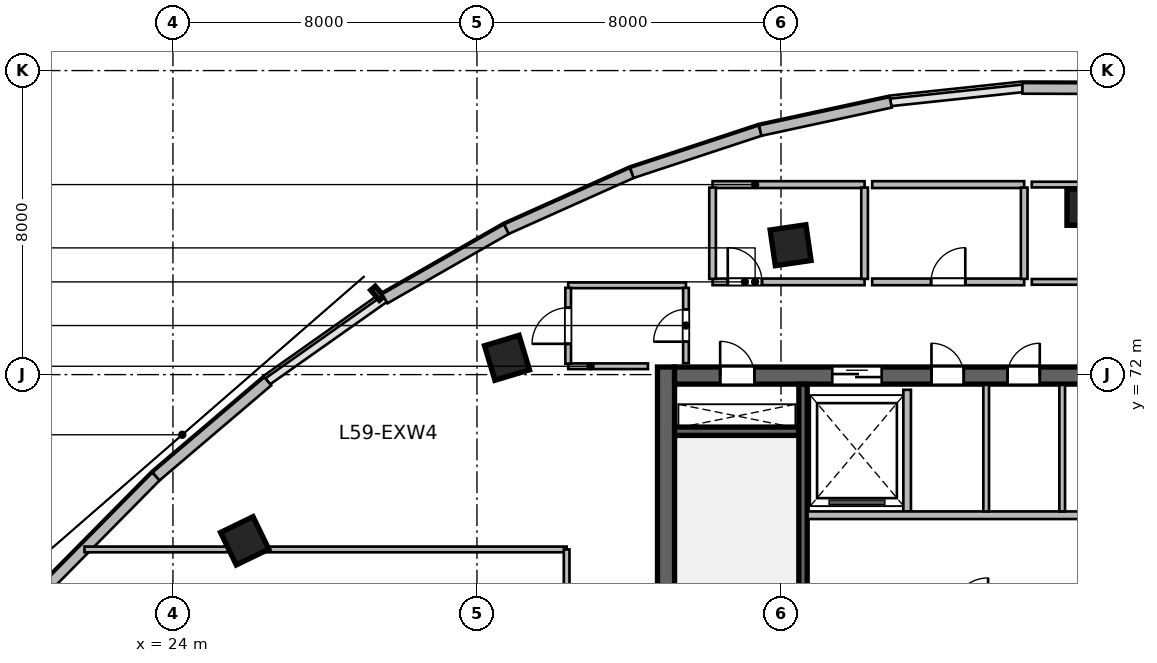
"""IFC4 building model, lengths in metres.
Left out: names, types, materials, properties, quantities, classifications, styles, units other than length and angle.
Written with IfcOpenShell. Run it as: python <this file> out.ifc"""

import sys

from ifc_helpers import new_model, si_unit, direction, frame, frame_2d, origin, origin_2d, place, context, subcontext, project, spatial, rectangle, extrude, source, transform, mapped, element, fill, save


model = new_model("IFC4")
c1 = context("Model", 3, precision=1e-05, world=origin(), true_north=direction((0.0, 1.0)))
c2 = subcontext(c1, "Body", "Model", "MODEL_VIEW")
j1 = project(units=[si_unit("LENGTHUNIT", "METRE"), si_unit("PLANEANGLEUNIT", "RADIAN")], contexts=[c1])
p1 = place(None, origin())
s1 = spatial("IfcSite", under=j1, at=p1, CompositionType="ELEMENT")
p2 = place(p1, origin())
s2 = spatial("IfcBuilding", under=s1, at=p2, CompositionType="ELEMENT")
p3 = place(p2, frame((0.0, 0.0, 243.0)))
s3 = spatial("IfcBuildingStorey", under=s2, at=p3, CompositionType="ELEMENT", Elevation=243.0)
m1 = source(origin(), c2, "Body", "SweptSolid", [
    extrude(rectangle(XDim=12.0, YDim=0.45, at=frame_2d((6.0, 0.0))), origin(), (0.0, 0.0, 1.0), 3.9),
])
p4 = place(p3, frame((36.975, 60.2, 0.0), z_axis=(0.0, 0.0, 1.0), x_axis=(0.0, 1.0, 0.0)))
e1 = element("IfcWall", 1, at=p4, inside=s3, PredefinedType="SHEAR", context=c2, shape_type="MappedRepresentation", body=[
    mapped(m1, transform((0.0, 0.0, 0.0), scale=1.0)),
])
m2 = source(origin(), c2, "Body", "SweptSolid", [
    extrude(rectangle(XDim=21.6, YDim=0.45, at=frame_2d((10.8, 0.0))), origin(), (0.0, 0.0, 1.0), 3.9),
])
p5 = place(p3, frame((37.2, 71.975, 0.0), z_axis=(0.0, 0.0, 1.0), x_axis=(1.0, 0.0, 0.0)))
e2 = element("IfcWall", 2, at=p5, inside=s3, PredefinedType="SHEAR", context=c2, shape_type="MappedRepresentation", body=[
    mapped(m2, transform((0.0, 0.0, 0.0), scale=1.0)),
])
p6 = place(p5, frame((1.2, 0.0, 0.0)))
e3 = element("IfcOpeningElement", 3, at=p6, cuts=e2, PredefinedType="OPENING", context=c2, shape_type="SweptSolid", body=[
    extrude(rectangle(XDim=0.9, YDim=2.1, at=frame_2d((0.45, 1.05))), frame((0.0, 0.235, 0.0), z_axis=(0.0, -1.0, 0.0), x_axis=(1.0, 0.0, 0.0)), (0.0, 0.0, 1.0), 0.47),
])
p7 = place(p5, frame((14.7, 0.0, 0.0)))
e4 = element("IfcOpeningElement", 4, at=p7, cuts=e2, PredefinedType="OPENING", context=c2, shape_type="SweptSolid", body=[
    extrude(rectangle(XDim=1.2, YDim=2.15, at=frame_2d((0.6, 1.075))), frame((0.0, 0.235, 0.0), z_axis=(0.0, -1.0, 0.0), x_axis=(1.0, 0.0, 0.0)), (0.0, 0.0, 1.0), 0.47),
])
p8 = place(p5, frame((4.15, 0.0, 0.0)))
e5 = element("IfcOpeningElement", 5, at=p8, cuts=e2, PredefinedType="OPENING", context=c2, shape_type="SweptSolid", body=[
    extrude(rectangle(XDim=1.3, YDim=2.15, at=frame_2d((0.65, 1.075))), frame((0.0, 0.235, 0.0), z_axis=(0.0, -1.0, 0.0), x_axis=(1.0, 0.0, 0.0)), (0.0, 0.0, 1.0), 0.47),
])
p9 = place(p5, frame((6.76, 0.0, 0.0)))
e6 = element("IfcOpeningElement", 6, at=p9, cuts=e2, PredefinedType="OPENING", context=c2, shape_type="SweptSolid", body=[
    extrude(rectangle(XDim=0.85, YDim=2.1, at=frame_2d((0.425, 1.05))), frame((0.0, 0.235, 0.0), z_axis=(0.0, -1.0, 0.0), x_axis=(1.0, 0.0, 0.0)), (0.0, 0.0, 1.0), 0.47),
])
p10 = place(p5, frame((8.76, 0.0, 0.0)))
e7 = element("IfcOpeningElement", 7, at=p10, cuts=e2, PredefinedType="OPENING", context=c2, shape_type="SweptSolid", body=[
    extrude(rectangle(XDim=0.85, YDim=2.1, at=frame_2d((0.425, 1.05))), frame((0.0, 0.235, 0.0), z_axis=(0.0, -1.0, 0.0), x_axis=(1.0, 0.0, 0.0)), (0.0, 0.0, 1.0), 0.47),
])
p11 = place(p5, frame((10.725, 0.0, 0.0)))
e8 = element("IfcOpeningElement", 8, at=p11, cuts=e2, PredefinedType="OPENING", context=c2, shape_type="SweptSolid", body=[
    extrude(rectangle(XDim=0.85, YDim=2.1, at=frame_2d((0.425, 1.05))), frame((0.0, 0.235, 0.0), z_axis=(0.0, -1.0, 0.0), x_axis=(1.0, 0.0, 0.0)), (0.0, 0.0, 1.0), 0.47),
])
m3 = source(origin(), c2, "Body", "SweptSolid", [
    extrude(rectangle(XDim=3.27, YDim=0.22, at=frame_2d((1.635, 0.0))), origin(), (0.0, 0.0, 1.0), 3.9),
])
p12 = place(p3, frame((37.2, 70.51, 0.0), z_axis=(0.0, 0.0, 1.0), x_axis=(1.0, 0.0, 0.0)))
e9 = element("IfcWall", 9, at=p12, inside=s3, PredefinedType="SHEAR", context=c2, shape_type="MappedRepresentation", body=[
    mapped(m3, transform((0.0, 0.0, 0.0), scale=1.0)),
])
m4 = source(origin(), c2, "Body", "SweptSolid", [
    extrude(rectangle(XDim=11.1, YDim=0.22, at=frame_2d((5.55, 0.0))), origin(), (0.0, 0.0, 1.0), 3.9),
])
p13 = place(p3, frame((40.58, 60.65, 0.0), z_axis=(0.0, 0.0, 1.0), x_axis=(0.0, 1.0, 0.0)))
e10 = element("IfcWall", 10, at=p13, inside=s3, PredefinedType="SHEAR", context=c2, shape_type="MappedRepresentation", body=[
    mapped(m4, transform((0.0, 0.0, 0.0), scale=1.0)),
])
m5 = source(origin(), c2, "Body", "SweptSolid", [
    extrude(rectangle(XDim=0.95, YDim=0.95, at=origin_2d()), origin(), (0.0, 0.0, 1.0), 3.9),
])
for number, where, z_axis, x_axis in (
    (11, (25.888, 67.627, 0.0), (0.0, 0.0, 1.0), (-0.436, 0.9, 0.0)),
    (12, (32.791, 72.442, 0.0), (0.0, 0.0, 1.0), (-0.289, 0.957, 0.0)),
    (13, (40.253, 75.404, 0.0), (0.0, 0.0, 1.0), (-0.143, 0.99, 0.0)),
    (14, (48.0, 76.404, 0.0), (0.0, 0.0, 1.0), (0.0, 1.0, 0.0)),
):
    element("IfcColumn", number, at=place(p3, frame(where, z_axis=z_axis, x_axis=x_axis)), inside=s3, PredefinedType="COLUMN", context=c2, shape_type="MappedRepresentation", body=[
        mapped(m5, transform((0.0, 0.0, 0.0), scale=1.0)),
    ])
m6 = source(origin(), c2, "Body", "SweptSolid", [
    extrude(rectangle(XDim=4.052, YDim=0.28, at=frame_2d((2.026, 0.0))), origin(), (0.0, 0.0, 1.0), 3.65),
])
p14 = place(p3, frame((18.176, 63.4, 0.0), z_axis=(0.0, 0.0, 1.0), x_axis=(0.641765301437, 0.76690110045, 0.0)))
e15 = element("IfcWall", 15, at=p14, inside=s3, PredefinedType="SOLIDWALL", context=c2, shape_type="MappedRepresentation", body=[
    mapped(m6, transform((0.0, 0.0, 0.0), scale=1.0)),
])
m7 = source(origin(), c2, "Body", "SweptSolid", [
    extrude(rectangle(XDim=3.955, YDim=0.28, at=frame_2d((1.978, 0.0))), origin(), (0.0, 0.0, 1.0), 3.65),
])
p15 = place(p3, frame((20.776, 66.507, 0.0), z_axis=(0.0, 0.0, 1.0), x_axis=(0.702710517474, 0.711475880569, 0.0)))
e16 = element("IfcWall", 16, at=p15, inside=s3, PredefinedType="SOLIDWALL", context=c2, shape_type="MappedRepresentation", body=[
    mapped(m7, transform((0.0, 0.0, 0.0), scale=1.0)),
])
m8 = source(origin(), c2, "Body", "SweptSolid", [
    extrude(rectangle(XDim=3.86, YDim=0.28, at=frame_2d((1.93, 0.0))), origin(), (0.0, 0.0, 1.0), 3.65),
])
p16 = place(p3, frame((23.556, 69.321, 0.0), z_axis=(0.0, 0.0, 1.0), x_axis=(0.761497547739, 0.648167790613, 0.0)))
e17 = element("IfcWall", 17, at=p16, inside=s3, PredefinedType="SOLIDWALL", context=c2, shape_type="MappedRepresentation", body=[
    mapped(m8, transform((0.0, 0.0, 0.0), scale=1.0)),
])
m9 = source(origin(), c2, "Body", "SweptSolid", [
    extrude(rectangle(XDim=3.688, YDim=0.28, at=frame_2d((1.844, 0.0))), origin(), (0.0, 0.0, 1.0), 3.65),
])
p17 = place(p3, frame((29.576, 73.998, 0.0), z_axis=(0.0, 0.0, 1.0), x_axis=(0.867929289274, 0.496687778005, 0.0)))
e18 = element("IfcWall", 18, at=p17, inside=s3, PredefinedType="SOLIDWALL", context=c2, shape_type="MappedRepresentation", body=[
    mapped(m9, transform((0.0, 0.0, 0.0), scale=1.0)),
])
m10 = source(origin(), c2, "Body", "SweptSolid", [
    extrude(rectangle(XDim=3.616, YDim=0.28, at=frame_2d((1.808, 0.0))), origin(), (0.0, 0.0, 1.0), 3.65),
])
p18 = place(p3, frame((32.777, 75.829, 0.0), z_axis=(0.0, 0.0, 1.0), x_axis=(0.912719530576, 0.408586659726, 0.0)))
e19 = element("IfcWall", 19, at=p18, inside=s3, PredefinedType="SOLIDWALL", context=c2, shape_type="MappedRepresentation", body=[
    mapped(m10, transform((0.0, 0.0, 0.0), scale=1.0)),
])
m11 = source(origin(), c2, "Body", "SweptSolid", [
    extrude(rectangle(XDim=3.557, YDim=0.28, at=frame_2d((1.778, 0.0))), origin(), (0.0, 0.0, 1.0), 3.65),
])
p19 = place(p3, frame((36.077, 77.307, 0.0), z_axis=(0.0, 0.0, 1.0), x_axis=(0.949687460385, 0.31319918197, 0.0)))
e20 = element("IfcWall", 20, at=p19, inside=s3, PredefinedType="SOLIDWALL", context=c2, shape_type="MappedRepresentation", body=[
    mapped(m11, transform((0.0, 0.0, 0.0), scale=1.0)),
])
m12 = source(origin(), c2, "Body", "SweptSolid", [
    extrude(rectangle(XDim=3.513, YDim=0.28, at=frame_2d((1.756, 0.0))), origin(), (0.0, 0.0, 1.0), 3.65),
])
p20 = place(p3, frame((39.455, 78.421, 0.0), z_axis=(0.0, 0.0, 1.0), x_axis=(0.977366029072, 0.211555300611, 0.0)))
e21 = element("IfcWall", 21, at=p20, inside=s3, PredefinedType="SOLIDWALL", context=c2, shape_type="MappedRepresentation", body=[
    mapped(m12, transform((0.0, 0.0, 0.0), scale=1.0)),
])
m13 = source(origin(), c2, "Body", "SweptSolid", [
    extrude(rectangle(XDim=3.477, YDim=0.28, at=frame_2d((1.739, 0.0))), origin(), (0.0, 0.0, 1.0), 3.65),
])
p21 = place(p3, frame((46.355, 79.531, 0.0), z_axis=(0.0, 0.0, 1.0), x_axis=(0.999995652268, -0.002948804142, 0.0)))
e22 = element("IfcWall", 22, at=p21, inside=s3, PredefinedType="SOLIDWALL", context=c2, shape_type="MappedRepresentation", body=[
    mapped(m13, transform((0.0, 0.0, 0.0), scale=1.0)),
])
m14 = source(origin(), c2, "Body", "SweptSolid", [
    extrude(rectangle(XDim=3.2, YDim=0.2, at=frame_2d((1.6, 0.0))), origin(), (0.0, 0.0, 1.0), 3.65),
])
p22 = place(p3, frame((43.32, 68.4, 0.0), z_axis=(0.0, 0.0, 1.0), x_axis=(0.0, 1.0, 0.0)))
e23 = element("IfcWall", 23, at=p22, inside=s3, PredefinedType="SOLIDWALL", context=c2, shape_type="MappedRepresentation", body=[
    mapped(m14, transform((0.0, 0.0, 0.0), scale=1.0)),
])
m15 = source(origin(), c2, "Body", "SweptSolid", [
    extrude(rectangle(XDim=8.8, YDim=0.2, at=frame_2d((4.4, 0.0))), origin(), (0.0, 0.0, 1.0), 3.65),
])
p23 = place(p3, frame((40.7, 68.3, 0.0), z_axis=(0.0, 0.0, 1.0), x_axis=(1.0, 0.0, 0.0)))
e24 = element("IfcWall", 24, at=p23, inside=s3, PredefinedType="SOLIDWALL", context=c2, shape_type="MappedRepresentation", body=[
    mapped(m15, transform((0.0, 0.0, 0.0), scale=1.0)),
])
m16 = source(origin(), c2, "Body", "SweptSolid", [
    extrude(rectangle(XDim=3.33, YDim=0.15, at=frame_2d((1.665, 0.0))), origin(), (0.0, 0.0, 1.0), 3.65),
])
for number, where, z_axis, x_axis in (
    (25, (45.4, 68.4, 0.0), (0.0, 0.0, 1.0), (0.0, 1.0, 0.0)),
    (26, (47.4, 68.4, 0.0), (0.0, 0.0, 1.0), (0.0, 1.0, 0.0)),
):
    element("IfcWall", number, at=place(p3, frame(where, z_axis=z_axis, x_axis=x_axis)), inside=s3, PredefinedType="PARTITIONING", context=c2, shape_type="MappedRepresentation", body=[
        mapped(m16, transform((0.0, 0.0, 0.0), scale=1.0)),
    ])
m17 = source(origin(), c2, "Body", "SweptSolid", [
    extrude(rectangle(XDim=2.1, YDim=0.15, at=frame_2d((1.05, 0.0))), origin(), (0.0, 0.0, 1.0), 3.65),
])
p24 = place(p3, frame((34.4, 72.22, 0.0), z_axis=(0.0, 0.0, 1.0), x_axis=(1.0, 0.0, 0.0)))
e27 = element("IfcWall", 27, at=p24, inside=s3, PredefinedType="PARTITIONING", context=c2, shape_type="MappedRepresentation", body=[
    mapped(m17, transform((0.0, 0.0, 0.0), scale=1.0)),
])
m18 = source(origin(), c2, "Body", "SweptSolid", [
    extrude(rectangle(XDim=3.1, YDim=0.15, at=frame_2d((1.55, 0.0))), origin(), (0.0, 0.0, 1.0), 3.081),
])
p25 = place(p3, frame((34.4, 74.35, 0.0), z_axis=(0.0, 0.0, 1.0), x_axis=(1.0, 0.0, 0.0)))
e28 = element("IfcWall", 28, at=p25, inside=s3, PredefinedType="PARTITIONING", context=c2, shape_type="MappedRepresentation", body=[
    mapped(m18, transform((0.0, 0.0, 0.0), scale=1.0)),
])
m19 = source(origin(), c2, "Body", "SweptSolid", [
    extrude(rectangle(XDim=1.995, YDim=0.15, at=frame_2d((0.998, 0.0))), origin(), (0.0, 0.0, 1.0), 3.65),
])
p26 = place(p3, frame((34.4, 72.288, 0.0), z_axis=(0.0, 0.0, 1.0), x_axis=(0.0, 1.0, 0.0)))
e29 = element("IfcWall", 29, at=p26, inside=s3, PredefinedType="PARTITIONING", context=c2, shape_type="MappedRepresentation", body=[
    mapped(m19, transform((0.0, 0.0, 0.0), scale=1.0)),
])
p27 = place(p26, frame((0.522, 0.0, 0.0)))
e30 = element("IfcOpeningElement", 30, at=p27, cuts=e29, PredefinedType="OPENING", context=c2, shape_type="SweptSolid", body=[
    extrude(rectangle(XDim=0.95, YDim=2.1, at=frame_2d((0.475, 1.05))), frame((0.0, 0.085, 0.0), z_axis=(0.0, -1.0, 0.0), x_axis=(1.0, 0.0, 0.0)), (0.0, 0.0, 1.0), 0.17),
])
m20 = source(origin(), c2, "Body", "SweptSolid", [
    extrude(rectangle(XDim=1.982, YDim=0.15, at=frame_2d((0.991, 0.0))), origin(), (0.0, 0.0, 1.0), 3.65),
])
p28 = place(p3, frame((37.5, 72.3, 0.0), z_axis=(0.0, 0.0, 1.0), x_axis=(0.0, 1.0, 0.0)))
e31 = element("IfcWall", 31, at=p28, inside=s3, PredefinedType="PARTITIONING", context=c2, shape_type="MappedRepresentation", body=[
    mapped(m20, transform((0.0, 0.0, 0.0), scale=1.0)),
])
p29 = place(p28, frame((0.566, 0.0, 0.0)))
e32 = element("IfcOpeningElement", 32, at=p29, cuts=e31, PredefinedType="OPENING", context=c2, shape_type="SweptSolid", body=[
    extrude(rectangle(XDim=0.85, YDim=2.1, at=frame_2d((0.425, 1.05))), frame((0.0, 0.085, 0.0), z_axis=(0.0, -1.0, 0.0), x_axis=(1.0, 0.0, 0.0)), (0.0, 0.0, 1.0), 0.17),
])
m21 = source(origin(), c2, "Body", "SweptSolid", [
    extrude(rectangle(XDim=4.0, YDim=0.175, at=frame_2d((2.0, 0.0))), origin(), (0.0, 0.0, 1.0), 3.65),
])
p30 = place(p3, frame((38.2, 74.44, 0.0), z_axis=(0.0, 0.0, 1.0), x_axis=(1.0, 0.0, 0.0)))
e33 = element("IfcWall", 33, at=p30, inside=s3, PredefinedType="PARTITIONING", context=c2, shape_type="MappedRepresentation", body=[
    mapped(m21, transform((0.0, 0.0, 0.0), scale=1.0)),
])
p31 = place(p30, frame((0.4, 0.0, 0.0)))
e34 = element("IfcOpeningElement", 34, at=p31, cuts=e33, PredefinedType="OPENING", context=c2, shape_type="SweptSolid", body=[
    extrude(rectangle(XDim=0.9, YDim=2.08, at=frame_2d((0.45, 1.04))), frame((0.0, 0.098, 0.0), z_axis=(0.0, -1.0, 0.0), x_axis=(1.0, 0.0, 0.0)), (0.0, 0.0, 1.0), 0.195),
])
m22 = source(origin(), c2, "Body", "SweptSolid", [
    extrude(rectangle(XDim=4.0, YDim=0.18, at=frame_2d((2.0, 0.0))), origin(), (0.0, 0.0, 1.0), 3.65),
])
p32 = place(p3, frame((38.2, 77.0, 0.0), z_axis=(0.0, 0.0, 1.0), x_axis=(1.0, 0.0, 0.0)))
e35 = element("IfcWall", 35, at=p32, inside=s3, PredefinedType="PLUMBINGWALL", context=c2, shape_type="MappedRepresentation", body=[
    mapped(m22, transform((0.0, 0.0, 0.0), scale=1.0)),
])
m23 = source(origin(), c2, "Body", "SweptSolid", [
    extrude(rectangle(XDim=2.403, YDim=0.175, at=frame_2d((1.201, 0.0))), origin(), (0.0, 0.0, 1.0), 3.65),
])
for number, where, z_axis, x_axis in (
    (36, (38.2, 74.519, 0.0), (0.0, 0.0, 1.0), (0.0, 1.0, 0.0)),
    (37, (42.2, 74.519, 0.0), (0.0, 0.0, 1.0), (0.0, 1.0, 0.0)),
):
    element("IfcWall", number, at=place(p3, frame(where, z_axis=z_axis, x_axis=x_axis)), inside=s3, PredefinedType="PARTITIONING", context=c2, shape_type="MappedRepresentation", body=[
        mapped(m23, transform((0.0, 0.0, 0.0), scale=1.0)),
    ])
p33 = place(p3, frame((42.4, 74.44, 0.0), z_axis=(0.0, 0.0, 1.0), x_axis=(1.0, 0.0, 0.0)))
e38 = element("IfcWall", 38, at=p33, inside=s3, PredefinedType="PARTITIONING", context=c2, shape_type="MappedRepresentation", body=[
    mapped(m21, transform((0.0, 0.0, 0.0), scale=1.0)),
])
p34 = place(p33, frame((1.55, 0.0, 0.0)))
e39 = element("IfcOpeningElement", 39, at=p34, cuts=e38, PredefinedType="OPENING", context=c2, shape_type="SweptSolid", body=[
    extrude(rectangle(XDim=0.9, YDim=2.08, at=frame_2d((0.45, 1.04))), frame((0.0, 0.098, 0.0), z_axis=(0.0, -1.0, 0.0), x_axis=(1.0, 0.0, 0.0)), (0.0, 0.0, 1.0), 0.195),
])
p35 = place(p3, frame((42.4, 77.0, 0.0), z_axis=(0.0, 0.0, 1.0), x_axis=(1.0, 0.0, 0.0)))
e40 = element("IfcWall", 40, at=p35, inside=s3, PredefinedType="PLUMBINGWALL", context=c2, shape_type="MappedRepresentation", body=[
    mapped(m22, transform((0.0, 0.0, 0.0), scale=1.0)),
])
p36 = place(p3, frame((46.4, 74.519, 0.0), z_axis=(0.0, 0.0, 1.0), x_axis=(0.0, 1.0, 0.0)))
e41 = element("IfcWall", 41, at=p36, inside=s3, PredefinedType="PARTITIONING", context=c2, shape_type="MappedRepresentation", body=[
    mapped(m23, transform((0.0, 0.0, 0.0), scale=1.0)),
])
m24 = source(origin(), c2, "Body", "SweptSolid", [
    extrude(rectangle(XDim=4.4, YDim=0.15, at=frame_2d((2.2, 0.0))), origin(), (0.0, 0.0, 1.0), 3.65),
])
p37 = place(p3, frame((46.6, 74.44, 0.0), z_axis=(0.0, 0.0, 1.0), x_axis=(1.0, 0.0, 0.0)))
e42 = element("IfcWall", 42, at=p37, inside=s3, PredefinedType="PARTITIONING", context=c2, shape_type="MappedRepresentation", body=[
    mapped(m24, transform((0.0, 0.0, 0.0), scale=1.0)),
])
p38 = place(p37, frame((1.725, 0.0, 0.0)))
e43 = element("IfcOpeningElement", 43, at=p38, cuts=e42, PredefinedType="OPENING", context=c2, shape_type="SweptSolid", body=[
    extrude(rectangle(XDim=0.95, YDim=2.1, at=frame_2d((0.475, 1.05))), frame((0.0, 0.085, 0.0), z_axis=(0.0, -1.0, 0.0), x_axis=(1.0, 0.0, 0.0)), (0.0, 0.0, 1.0), 0.17),
])
p39 = place(p3, frame((46.6, 77.0, 0.0), z_axis=(0.0, 0.0, 1.0), x_axis=(1.0, 0.0, 0.0)))
e44 = element("IfcWall", 44, at=p39, inside=s3, PredefinedType="PARTITIONING", context=c2, shape_type="MappedRepresentation", body=[
    mapped(m24, transform((0.0, 0.0, 0.0), scale=1.0)),
])
m25 = source(origin(), c2, "Body", "SweptSolid", [
    extrude(rectangle(XDim=12.688, YDim=0.15, at=frame_2d((6.344, 0.0))), origin(), (0.0, 0.0, 1.0), 3.65),
])
p40 = place(p3, frame((21.672, 67.4, 0.0), z_axis=(0.0, 0.0, 1.0), x_axis=(1.0, 0.0, 0.0)))
e45 = element("IfcWall", 45, at=p40, inside=s3, PredefinedType="PARTITIONING", context=c2, shape_type="MappedRepresentation", body=[
    mapped(m25, transform((0.0, 0.0, 0.0), scale=1.0)),
])
m26 = source(origin(), c2, "Body", "SweptSolid", [
    extrude(rectangle(XDim=3.2, YDim=0.15, at=frame_2d((1.6, 0.0))), origin(), (0.0, 0.0, 1.0), 3.65),
])
p41 = place(p3, frame((34.36, 64.2, 0.0), z_axis=(0.0, 0.0, 1.0), x_axis=(0.0, 1.0, 0.0)))
e46 = element("IfcWall", 46, at=p41, inside=s3, PredefinedType="PARTITIONING", context=c2, shape_type="MappedRepresentation", body=[
    mapped(m26, transform((0.0, 0.0, 0.0), scale=1.0)),
])
p42 = place(p41, frame((1.125, 0.0, 0.0)))
e47 = element("IfcOpeningElement", 47, at=p42, cuts=e46, PredefinedType="OPENING", context=c2, shape_type="SweptSolid", body=[
    extrude(rectangle(XDim=0.95, YDim=2.1, at=frame_2d((0.475, 1.05))), frame((0.0, 0.085, 0.0), z_axis=(0.0, -1.0, 0.0), x_axis=(1.0, 0.0, 0.0)), (0.0, 0.0, 1.0), 0.17),
])
m27 = source(origin(), c2, "Body", "SweptSolid", [
    extrude(rectangle(XDim=0.9, YDim=2.1, at=frame_2d((0.45, 1.05))), frame((0.0, 0.025, 0.0), z_axis=(0.0, -1.0, 0.0), x_axis=(1.0, 0.0, 0.0)), (0.0, 0.0, 1.0), 0.05),
])
p43 = place(p6, origin())
e48 = element("IfcDoor", 48, at=p43, inside=s3, OperationType="SINGLE_SWING_LEFT", PredefinedType="DOOR", context=c2, shape_type="MappedRepresentation", body=[
    mapped(m27, transform((0.0, 0.0, 0.0), scale=1.0)),
])
fill(e3, e48)
m28 = source(origin(), c2, "Body", "SweptSolid", [
    extrude(rectangle(XDim=1.3, YDim=2.15, at=frame_2d((0.65, 1.075))), frame((0.0, 0.025, 0.0), z_axis=(0.0, -1.0, 0.0), x_axis=(1.0, 0.0, 0.0)), (0.0, 0.0, 1.0), 0.05),
])
p44 = place(p8, origin())
e49 = element("IfcDoor", 49, at=p44, inside=s3, OperationType="DOUBLE_DOOR_SLIDING", PredefinedType="DOOR", context=c2, shape_type="MappedRepresentation", body=[
    mapped(m28, transform((0.0, 0.0, 0.0), scale=1.0)),
])
fill(e5, e49)
m29 = source(origin(), c2, "Body", "SweptSolid", [
    extrude(rectangle(XDim=0.85, YDim=2.1, at=frame_2d((0.425, 1.05))), frame((0.0, 0.025, 0.0), z_axis=(0.0, -1.0, 0.0), x_axis=(1.0, 0.0, 0.0)), (0.0, 0.0, 1.0), 0.05),
])
p45 = place(p9, origin())
e50 = element("IfcDoor", 50, at=p45, inside=s3, OperationType="SINGLE_SWING_LEFT", PredefinedType="DOOR", context=c2, shape_type="MappedRepresentation", body=[
    mapped(m29, transform((0.0, 0.0, 0.0), scale=1.0)),
])
fill(e6, e50)
p46 = place(p10, origin())
e51 = element("IfcDoor", 51, at=p46, inside=s3, OperationType="SINGLE_SWING_RIGHT", PredefinedType="DOOR", context=c2, shape_type="MappedRepresentation", body=[
    mapped(m29, transform((0.0, 0.0, 0.0), scale=1.0)),
])
fill(e7, e51)
p47 = place(p29, origin())
e52 = element("IfcDoor", 52, at=p47, inside=s3, OperationType="SINGLE_SWING_LEFT", PredefinedType="DOOR", context=c2, shape_type="MappedRepresentation", body=[
    mapped(m29, transform((0.0, 0.0, 0.0), scale=1.0)),
])
fill(e32, e52)
m30 = source(origin(), c2, "Body", "SweptSolid", [
    extrude(rectangle(XDim=0.9, YDim=2.08, at=frame_2d((0.45, 1.04))), frame((0.0, 0.025, 0.0), z_axis=(0.0, -1.0, 0.0), x_axis=(1.0, 0.0, 0.0)), (0.0, 0.0, 1.0), 0.05),
])
p48 = place(p31, origin())
e53 = element("IfcDoor", 53, at=p48, inside=s3, OperationType="SINGLE_SWING_LEFT", PredefinedType="DOOR", context=c2, shape_type="MappedRepresentation", body=[
    mapped(m30, transform((0.0, 0.0, 0.0), scale=1.0)),
])
fill(e34, e53)
p49 = place(p34, origin())
e54 = element("IfcDoor", 54, at=p49, inside=s3, OperationType="SINGLE_SWING_RIGHT", PredefinedType="DOOR", context=c2, shape_type="MappedRepresentation", body=[
    mapped(m30, transform((0.0, 0.0, 0.0), scale=1.0)),
])
fill(e39, e54)
m31 = source(origin(), c2, "Body", "SweptSolid", [
    extrude(rectangle(XDim=0.95, YDim=2.1, at=frame_2d((0.475, 1.05))), frame((0.0, 0.025, 0.0), z_axis=(0.0, -1.0, 0.0), x_axis=(1.0, 0.0, 0.0)), (0.0, 0.0, 1.0), 0.05),
])
p50 = place(p27, origin())
e55 = element("IfcDoor", 55, at=p50, inside=s3, OperationType="SINGLE_SWING_LEFT", PredefinedType="DOOR", context=c2, shape_type="MappedRepresentation", body=[
    mapped(m31, transform((0.0, 0.0, 0.0), scale=1.0)),
])
fill(e30, e55)
save(model, sys.argv[1])
